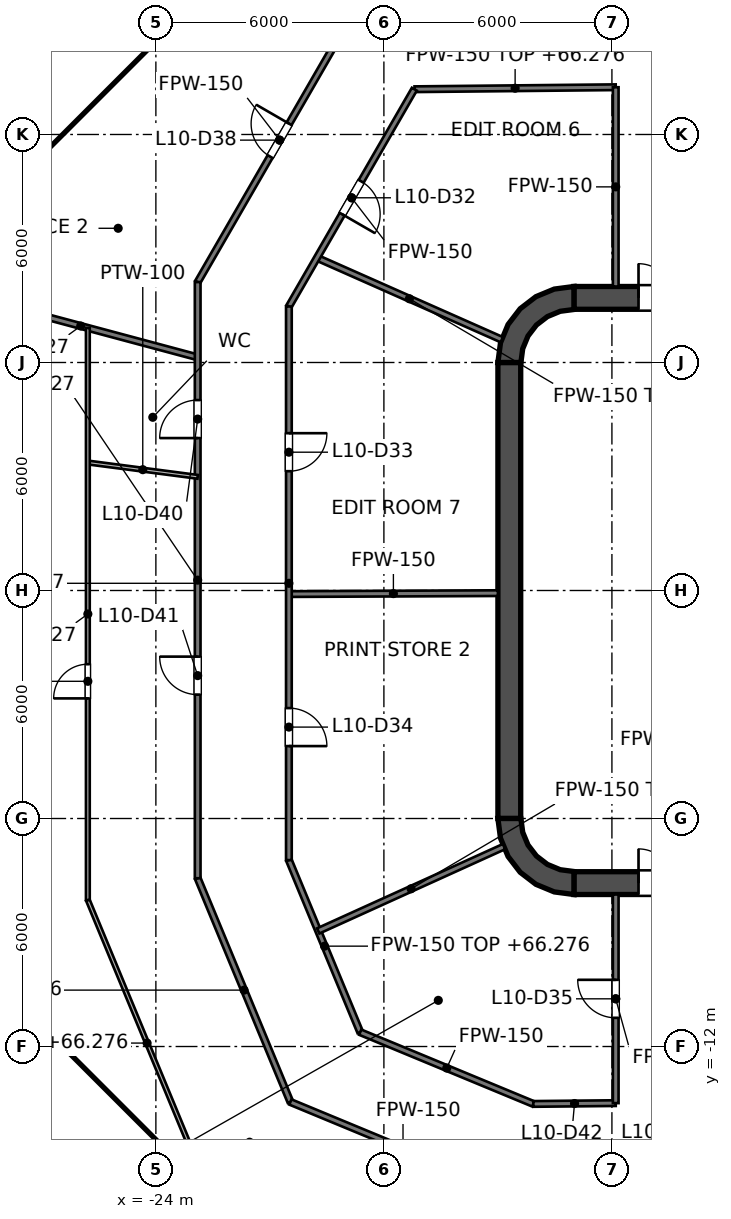
"""IFC4 building model, lengths in metres.
Left out: names, types, materials, properties, quantities, classifications, styles, units other than length and angle.
Written with IfcOpenShell. Run it as: python <this file> out.ifc"""

import sys

from ifc_helpers import new_model, si_unit, direction, frame, frame_2d, origin, place, context, subcontext, project, spatial, polyline, rectangle, outline, extrude, element, fill, save


model = new_model("IFC4")
c1 = context("Model", 3, precision=1e-05, world=origin(), true_north=direction((0.0, 1.0)))
c2 = subcontext(c1, "Body", "Model", "MODEL_VIEW")
j1 = project(units=[si_unit("LENGTHUNIT", "METRE"), si_unit("PLANEANGLEUNIT", "RADIAN")], contexts=[c1])
p1 = place(None, origin())
s1 = spatial("IfcSite", under=j1, at=p1, CompositionType="ELEMENT")
p2 = place(p1, origin())
s2 = spatial("IfcBuilding", under=s1, at=p2, CompositionType="ELEMENT")
p3 = place(p2, frame((0.0, 0.0, 63.0)))
s3 = spatial("IfcBuildingStorey", under=s2, at=p3, CompositionType="ELEMENT", Elevation=63.0)
p4 = place(p3, frame((-13.0, 7.7, 0.0), z_axis=(0.0, 0.0, 1.0), x_axis=(1.0, 0.0, 0.0)))
e1 = element("IfcWall", 1, at=p4, inside=s3, PredefinedType="SHEAR", context=c2, shape_type="SweptSolid", body=[
    extrude(rectangle(XDim=26.0, YDim=0.6, at=frame_2d((13.0, 0.0))), origin(), (0.0, 0.0, 1.0), 4.2),
])
p5 = place(p4, frame((1.7, 0.0, 0.0)))
e2 = element("IfcOpeningElement", 2, at=p5, cuts=e1, PredefinedType="OPENING", context=c2, shape_type="SweptSolid", body=[
    extrude(rectangle(XDim=1.8, YDim=2.1, at=frame_2d((0.9, 1.05))), frame((0.0, 0.3, 0.0), z_axis=(0.0, -1.0, 0.0), x_axis=(1.0, 0.0, 0.0)), (0.0, 0.0, 1.0), 0.6),
])
p6 = place(p4, frame((22.5, 0.0, 0.0)))
e3 = element("IfcOpeningElement", 3, at=p6, cuts=e1, PredefinedType="OPENING", context=c2, shape_type="SweptSolid", body=[
    extrude(rectangle(XDim=1.8, YDim=2.1, at=frame_2d((0.9, 1.05))), frame((0.0, 0.3, 0.0), z_axis=(0.0, -1.0, 0.0), x_axis=(1.0, 0.0, 0.0)), (0.0, 0.0, 1.0), 0.6),
])
p7 = place(p3, frame((-13.0, -7.7, 0.0), z_axis=(0.0, 0.0, 1.0), x_axis=(1.0, 0.0, 0.0)))
e4 = element("IfcWall", 4, at=p7, inside=s3, PredefinedType="SHEAR", context=c2, shape_type="SweptSolid", body=[
    extrude(rectangle(XDim=26.0, YDim=0.6, at=frame_2d((13.0, 0.0))), origin(), (0.0, 0.0, 1.0), 4.2),
])
p8 = place(p7, frame((1.7, 0.0, 0.0)))
e5 = element("IfcOpeningElement", 5, at=p8, cuts=e4, PredefinedType="OPENING", context=c2, shape_type="SweptSolid", body=[
    extrude(rectangle(XDim=1.8, YDim=2.1, at=frame_2d((0.9, 1.05))), frame((0.0, 0.3, 0.0), z_axis=(0.0, -1.0, 0.0), x_axis=(1.0, 0.0, 0.0)), (0.0, 0.0, 1.0), 0.6),
])
p9 = place(p7, frame((22.5, 0.0, 0.0)))
e6 = element("IfcOpeningElement", 6, at=p9, cuts=e4, PredefinedType="OPENING", context=c2, shape_type="SweptSolid", body=[
    extrude(rectangle(XDim=1.8, YDim=2.1, at=frame_2d((0.9, 1.05))), frame((0.0, 0.3, 0.0), z_axis=(0.0, -1.0, 0.0), x_axis=(1.0, 0.0, 0.0)), (0.0, 0.0, 1.0), 0.6),
])
p10 = place(p3, frame((-14.7, -6.0, 0.0), z_axis=(0.0, 0.0, 1.0), x_axis=(0.0, 1.0, 0.0)))
e7 = element("IfcWall", 7, at=p10, inside=s3, PredefinedType="SHEAR", context=c2, shape_type="SweptSolid", body=[
    extrude(rectangle(XDim=12.0, YDim=0.6, at=frame_2d((6.0, 0.0))), origin(), (0.0, 0.0, 1.0), 4.2),
])
p11 = place(p3, origin())
e8 = element("IfcWall", 8, at=p11, inside=s3, PredefinedType="SHEAR", context=c2, shape_type="SweptSolid", body=[
    extrude(outline(polyline([(-15.0, 6.0), (-14.395, 6.0), (-14.347, 6.361), (-14.208, 6.698), (-13.986, 6.986), (-13.698, 7.208), (-13.361, 7.347), (-13.0, 7.395), (-13.0, 8.0), (-13.518, 7.932), (-14.0, 7.732), (-14.414, 7.414), (-14.732, 7.0), (-14.932, 6.518), (-15.0, 6.0)])), origin(), (0.0, 0.0, 1.0), 4.2),
])
e9 = element("IfcWall", 9, at=p11, inside=s3, PredefinedType="SHEAR", context=c2, shape_type="SweptSolid", body=[
    extrude(outline(polyline([(-13.0, -8.0), (-13.0, -7.395), (-13.361, -7.347), (-13.698, -7.208), (-13.986, -6.986), (-14.208, -6.698), (-14.347, -6.361), (-14.395, -6.0), (-15.0, -6.0), (-14.932, -6.518), (-14.732, -7.0), (-14.414, -7.414), (-14.0, -7.732), (-13.518, -7.932), (-13.0, -8.0)])), origin(), (0.0, 0.0, 1.0), 4.2),
])
p12 = place(p3, frame((-11.8, -7.4, 0.0), z_axis=(0.0, 0.0, 1.0), x_axis=(0.0, 1.0, 0.0)))
e10 = element("IfcWall", 10, at=p12, inside=s3, PredefinedType="SOLIDWALL", context=c2, shape_type="SweptSolid", body=[
    extrude(rectangle(XDim=14.8, YDim=0.4, at=frame_2d((7.4, 0.0))), origin(), (0.0, 0.0, 1.0), 4.05),
])
p13 = place(p12, frame((11.2, 0.0, 0.0)))
e11 = element("IfcOpeningElement", 11, at=p13, cuts=e10, PredefinedType="OPENING", context=c2, shape_type="SweptSolid", body=[
    extrude(rectangle(XDim=1.1, YDim=2.1, at=frame_2d((0.55, 1.05))), frame((0.0, 0.2, 0.0), z_axis=(0.0, -1.0, 0.0), x_axis=(1.0, 0.0, 0.0)), (0.0, 0.0, 1.0), 0.4),
])
p14 = place(p12, frame((8.3, 0.0, 0.0)))
e12 = element("IfcOpeningElement", 12, at=p14, cuts=e10, PredefinedType="OPENING", context=c2, shape_type="SweptSolid", body=[
    extrude(rectangle(XDim=1.1, YDim=2.1, at=frame_2d((0.55, 1.05))), frame((0.0, 0.2, 0.0), z_axis=(0.0, -1.0, 0.0), x_axis=(1.0, 0.0, 0.0)), (0.0, 0.0, 1.0), 0.4),
])
p15 = place(p12, frame((5.4, 0.0, 0.0)))
e13 = element("IfcOpeningElement", 13, at=p15, cuts=e10, PredefinedType="OPENING", context=c2, shape_type="SweptSolid", body=[
    extrude(rectangle(XDim=1.1, YDim=2.1, at=frame_2d((0.55, 1.05))), frame((0.0, 0.2, 0.0), z_axis=(0.0, -1.0, 0.0), x_axis=(1.0, 0.0, 0.0)), (0.0, 0.0, 1.0), 0.4),
])
p16 = place(p12, frame((13.552, 0.0, 0.0)))
e14 = element("IfcOpeningElement", 14, at=p16, cuts=e10, PredefinedType="OPENING", context=c2, shape_type="SweptSolid", body=[
    extrude(rectangle(XDim=0.9, YDim=2.1, at=frame_2d((0.45, 1.05))), frame((0.0, 0.2, 0.0), z_axis=(0.0, -1.0, 0.0), x_axis=(1.0, 0.0, 0.0)), (0.0, 0.0, 1.0), 0.4),
])
p17 = place(p12, frame((0.347, 0.0, 0.0)))
e15 = element("IfcOpeningElement", 15, at=p17, cuts=e10, PredefinedType="OPENING", context=c2, shape_type="SweptSolid", body=[
    extrude(rectangle(XDim=0.9, YDim=2.1, at=frame_2d((0.45, 1.05))), frame((0.0, 0.2, 0.0), z_axis=(0.0, -1.0, 0.0), x_axis=(1.0, 0.0, 0.0)), (0.0, 0.0, 1.0), 0.4),
])
e16 = element("IfcWall", 16, at=p11, inside=s3, PredefinedType="SOLIDWALL", context=c2, shape_type="SweptSolid", body=[
    extrude(outline(polyline([(-12.0, -5.925), (-12.0, -5.675), (-14.15, -5.675), (-14.15, -3.025), (-12.0, -3.025), (-12.0, -2.775), (-14.15, -2.775), (-14.15, -0.125), (-12.0, -0.125), (-12.0, 0.125), (-14.15, 0.125), (-14.15, 2.775), (-12.0, 2.775), (-12.0, 3.025), (-14.15, 3.025), (-14.15, 5.675), (-12.0, 5.675), (-12.0, 5.925), (-14.15, 5.925), (-14.4, 5.925), (-14.4, 5.675), (-14.4, 3.025), (-14.4, 2.775), (-14.4, 0.125), (-14.4, -0.125), (-14.4, -2.775), (-14.4, -3.025), (-14.4, -5.675), (-14.4, -5.925), (-14.15, -5.925), (-12.0, -5.925)])), origin(), (0.0, 0.0, 1.0), 4.05),
])
p18 = place(p3, frame((-22.9, -7.572, 0.0), z_axis=(0.0, 0.0, 1.0), x_axis=(0.382860357704, -0.923806227788, 0.0)))
e17 = element("IfcWall", 17, at=p18, inside=s3, PredefinedType="PARTITIONING", context=c2, shape_type="SweptSolid", body=[
    extrude(rectangle(XDim=6.374, YDim=0.15, at=frame_2d((3.187, 0.0))), origin(), (0.0, 0.0, 1.0), 3.276),
])
p19 = place(p3, frame((-20.5, -7.095, 0.0), z_axis=(0.0, 0.0, 1.0), x_axis=(0.382878184095, -0.923798839653, 0.0)))
e18 = element("IfcWall", 18, at=p19, inside=s3, PredefinedType="PARTITIONING", context=c2, shape_type="SweptSolid", body=[
    extrude(rectangle(XDim=4.902, YDim=0.15, at=frame_2d((2.451, 0.0))), origin(), (0.0, 0.0, 1.0), 3.276),
])
p20 = place(p3, frame((-19.76, 8.755, 0.0), z_axis=(0.0, 0.0, 1.0), x_axis=(0.91424834547, -0.405154245695, 0.0)))
e19 = element("IfcWall", 19, at=p20, inside=s3, PredefinedType="PARTITIONING", context=c2, shape_type="SweptSolid", body=[
    extrude(rectangle(XDim=5.318, YDim=0.15, at=frame_2d((2.659, 0.0))), origin(), (0.0, 0.0, 1.0), 3.276),
])
p21 = place(p3, frame((-20.46, -13.46, 0.0), z_axis=(0.0, 0.0, 1.0), x_axis=(0.923801547606, -0.382871650349, 0.0)))
e20 = element("IfcWall", 20, at=p21, inside=s3, PredefinedType="PARTITIONING", context=c2, shape_type="SweptSolid", body=[
    extrude(rectangle(XDim=6.415, YDim=0.15, at=frame_2d((3.208, 0.0))), origin(), (0.0, 0.0, 1.0), 3.195),
])
p22 = place(p3, frame((-18.623, -11.623, 0.0), z_axis=(0.0, 0.0, 1.0), x_axis=(0.923816441303, -0.382835712518, 0.0)))
e21 = element("IfcWall", 21, at=p22, inside=s3, PredefinedType="PARTITIONING", context=c2, shape_type="SweptSolid", body=[
    extrude(rectangle(XDim=4.931, YDim=0.15, at=frame_2d((2.465, 0.0))), origin(), (0.0, 0.0, 1.0), 3.195),
])
p23 = place(p3, frame((-29.055, 7.785, 0.0), z_axis=(0.0, 0.0, 1.0), x_axis=(0.965937962099, -0.258773749396, 0.0)))
e22 = element("IfcWall", 22, at=p23, inside=s3, PredefinedType="PARTITIONING", context=c2, shape_type="SweptSolid", body=[
    extrude(rectangle(XDim=6.372, YDim=0.15, at=frame_2d((3.186, 0.0))), origin(), (0.0, 0.0, 1.0), 3.727),
])
p24 = place(p3, frame((-20.5, -0.094, 0.0), z_axis=(0.0, 0.0, 1.0), x_axis=(0.999990148138, 0.004438876723, 0.0)))
e23 = element("IfcWall", 23, at=p24, inside=s3, PredefinedType="PARTITIONING", context=c2, shape_type="SweptSolid", body=[
    extrude(rectangle(XDim=5.5, YDim=0.15, at=frame_2d((2.75, 0.0))), origin(), (0.0, 0.0, 1.0), 3.195),
])
p25 = place(p3, frame((-14.068, -13.511, 0.0), z_axis=(0.0, 0.0, 1.0), x_axis=(0.999950911515, 0.009908307647, 0.0)))
e24 = element("IfcWall", 24, at=p25, inside=s3, PredefinedType="PARTITIONING", context=c2, shape_type="SweptSolid", body=[
    extrude(rectangle(XDim=2.168, YDim=0.15, at=frame_2d((1.084, 0.0))), origin(), (0.0, 0.0, 1.0), 3.276),
])
p26 = place(p3, frame((-17.194, 13.191, 0.0), z_axis=(0.0, 0.0, 1.0), x_axis=(0.999950394899, 0.009960308291, 0.0)))
e25 = element("IfcWall", 25, at=p26, inside=s3, PredefinedType="PARTITIONING", context=c2, shape_type="SweptSolid", body=[
    extrude(rectangle(XDim=5.294, YDim=0.15, at=frame_2d((2.647, 0.0))), origin(), (0.0, 0.0, 1.0), 3.276),
])
p27 = place(p3, frame((-19.728, -8.958, 0.0), z_axis=(0.0, 0.0, 1.0), x_axis=(0.910629511797, 0.413223779863, 0.0)))
e26 = element("IfcWall", 26, at=p27, inside=s3, PredefinedType="PARTITIONING", context=c2, shape_type="SweptSolid", body=[
    extrude(rectangle(XDim=5.368, YDim=0.15, at=frame_2d((2.684, 0.0))), origin(), (0.0, 0.0, 1.0), 4.05),
])
p28 = place(p3, frame((-20.5, 7.474, 0.0), z_axis=(0.0, 0.0, 1.0), x_axis=(0.500012665616, 0.866018091164, 0.0)))
e27 = element("IfcWall", 27, at=p28, inside=s3, PredefinedType="PARTITIONING", context=c2, shape_type="SweptSolid", body=[
    extrude(rectangle(XDim=6.602, YDim=0.15, at=frame_2d((3.301, 0.0))), origin(), (0.0, 0.0, 1.0), 3.195),
])
p29 = place(p28, frame((2.803, 0.0, 0.0)))
e28 = element("IfcOpeningElement", 28, at=p29, cuts=e27, PredefinedType="OPENING", context=c2, shape_type="SweptSolid", body=[
    extrude(rectangle(XDim=1.0, YDim=2.1, at=frame_2d((0.5, 1.05))), frame((0.0, 0.075, 0.0), z_axis=(0.0, -1.0, 0.0), x_axis=(1.0, 0.0, 0.0)), (0.0, 0.0, 1.0), 0.15),
])
p30 = place(p3, frame((-22.9, 8.117, 0.0), z_axis=(0.0, 0.0, 1.0), x_axis=(0.499983791763, 0.866034761412, 0.0)))
e29 = element("IfcWall", 29, at=p30, inside=s3, PredefinedType="PARTITIONING", context=c2, shape_type="SweptSolid", body=[
    extrude(rectangle(XDim=8.626, YDim=0.15, at=frame_2d((4.313, 0.0))), origin(), (0.0, 0.0, 1.0), 3.195),
])
p31 = place(p30, frame((3.812, 0.0, 0.0)))
e30 = element("IfcOpeningElement", 30, at=p31, cuts=e29, PredefinedType="OPENING", context=c2, shape_type="SweptSolid", body=[
    extrude(rectangle(XDim=1.0, YDim=2.1, at=frame_2d((0.5, 1.05))), frame((0.0, 0.075, 0.0), z_axis=(0.0, -1.0, 0.0), x_axis=(1.0, 0.0, 0.0)), (0.0, 0.0, 1.0), 0.15),
])
p32 = place(p3, frame((-11.9, -13.49, 0.0), z_axis=(0.0, 0.0, 1.0), x_axis=(0.0, 1.0, 0.0)))
e31 = element("IfcWall", 31, at=p32, inside=s3, PredefinedType="PARTITIONING", context=c2, shape_type="SweptSolid", body=[
    extrude(rectangle(XDim=5.49, YDim=0.15, at=frame_2d((2.745, 0.0))), origin(), (0.0, 0.0, 1.0), 3.195),
])
p33 = place(p32, frame((2.245, 0.0, 0.0)))
e32 = element("IfcOpeningElement", 32, at=p33, cuts=e31, PredefinedType="OPENING", context=c2, shape_type="SweptSolid", body=[
    extrude(rectangle(XDim=1.0, YDim=2.1, at=frame_2d((0.5, 1.05))), frame((0.0, 0.075, 0.0), z_axis=(0.0, -1.0, 0.0), x_axis=(1.0, 0.0, 0.0)), (0.0, 0.0, 1.0), 0.15),
])
p34 = place(p3, frame((-11.9, 8.0, 0.0), z_axis=(0.0, 0.0, 1.0), x_axis=(0.0, 1.0, 0.0)))
e33 = element("IfcWall", 33, at=p34, inside=s3, PredefinedType="PARTITIONING", context=c2, shape_type="SweptSolid", body=[
    extrude(rectangle(XDim=5.243, YDim=0.15, at=frame_2d((2.622, 0.0))), origin(), (0.0, 0.0, 1.0), 3.195),
])
p35 = place(p3, frame((-20.5, -7.095, 0.0), z_axis=(0.0, 0.0, 1.0), x_axis=(0.0, 1.0, 0.0)))
e34 = element("IfcWall", 34, at=p35, inside=s3, PredefinedType="PARTITIONING", context=c2, shape_type="SweptSolid", body=[
    extrude(rectangle(XDim=14.569, YDim=0.15, at=frame_2d((7.285, 0.0))), origin(), (0.0, 0.0, 1.0), 3.127),
])
p36 = place(p35, frame((10.234, 0.0, 0.0)))
e35 = element("IfcOpeningElement", 35, at=p36, cuts=e34, PredefinedType="OPENING", context=c2, shape_type="SweptSolid", body=[
    extrude(rectangle(XDim=1.0, YDim=2.1, at=frame_2d((0.5, 1.05))), frame((0.0, 0.075, 0.0), z_axis=(0.0, -1.0, 0.0), x_axis=(1.0, 0.0, 0.0)), (0.0, 0.0, 1.0), 0.15),
])
p37 = place(p35, frame((3.0, 0.0, 0.0)))
e36 = element("IfcOpeningElement", 36, at=p37, cuts=e34, PredefinedType="OPENING", context=c2, shape_type="SweptSolid", body=[
    extrude(rectangle(XDim=1.0, YDim=2.1, at=frame_2d((0.5, 1.05))), frame((0.0, 0.075, 0.0), z_axis=(0.0, -1.0, 0.0), x_axis=(1.0, 0.0, 0.0)), (0.0, 0.0, 1.0), 0.15),
])
p38 = place(p3, frame((-22.9, -7.572, 0.0), z_axis=(0.0, 0.0, 1.0), x_axis=(0.0, 1.0, 0.0)))
e37 = element("IfcWall", 37, at=p38, inside=s3, PredefinedType="PARTITIONING", context=c2, shape_type="SweptSolid", body=[
    extrude(rectangle(XDim=15.689, YDim=0.15, at=frame_2d((7.844, 0.0))), origin(), (0.0, 0.0, 1.0), 3.127),
])
p39 = place(p38, frame((11.583, 0.0, 0.0)))
e38 = element("IfcOpeningElement", 38, at=p39, cuts=e37, PredefinedType="OPENING", context=c2, shape_type="SweptSolid", body=[
    extrude(rectangle(XDim=1.0, YDim=2.1, at=frame_2d((0.5, 1.05))), frame((0.0, 0.075, 0.0), z_axis=(0.0, -1.0, 0.0), x_axis=(1.0, 0.0, 0.0)), (0.0, 0.0, 1.0), 0.15),
])
p40 = place(p38, frame((4.832, 0.0, 0.0)))
e39 = element("IfcOpeningElement", 39, at=p40, cuts=e37, PredefinedType="OPENING", context=c2, shape_type="SweptSolid", body=[
    extrude(rectangle(XDim=1.0, YDim=2.1, at=frame_2d((0.5, 1.05))), frame((0.0, 0.075, 0.0), z_axis=(0.0, -1.0, 0.0), x_axis=(1.0, 0.0, 0.0)), (0.0, 0.0, 1.0), 0.15),
])
p41 = place(p3, frame((-25.79, -8.147, 0.0), z_axis=(0.0, 0.0, 1.0), x_axis=(0.382777969207, -0.923840368402, 0.0)))
e40 = element("IfcWall", 40, at=p41, inside=s3, PredefinedType="PARTITIONING", context=c2, shape_type="SweptSolid", body=[
    extrude(rectangle(XDim=8.146, YDim=0.1, at=frame_2d((4.073, 0.0))), origin(), (0.0, 0.0, 1.0), 3.276),
])
p42 = place(p3, frame((-25.79, 3.368, 0.0), z_axis=(0.0, 0.0, 1.0), x_axis=(0.991601345334, -0.129332022064, 0.0)))
e41 = element("IfcWall", 41, at=p42, inside=s3, PredefinedType="PARTITIONING", context=c2, shape_type="SweptSolid", body=[
    extrude(rectangle(XDim=2.915, YDim=0.1, at=frame_2d((1.457, 0.0))), origin(), (0.0, 0.0, 1.0), 4.05),
])
p43 = place(p3, frame((-25.79, -8.147, 0.0), z_axis=(0.0, 0.0, 1.0), x_axis=(0.0, 1.0, 0.0)))
e42 = element("IfcWall", 42, at=p43, inside=s3, PredefinedType="PARTITIONING", context=c2, shape_type="SweptSolid", body=[
    extrude(rectangle(XDim=15.057, YDim=0.1, at=frame_2d((7.528, 0.0))), origin(), (0.0, 0.0, 1.0), 3.127),
])
p44 = place(p43, frame((5.308, 0.0, 0.0)))
e43 = element("IfcOpeningElement", 43, at=p44, cuts=e42, PredefinedType="OPENING", context=c2, shape_type="SweptSolid", body=[
    extrude(rectangle(XDim=0.9, YDim=2.1, at=frame_2d((0.45, 1.05))), frame((0.0, 0.05, 0.0), z_axis=(0.0, -1.0, 0.0), x_axis=(1.0, 0.0, 0.0)), (0.0, 0.0, 1.0), 0.1),
])
p45 = place(p13, origin())
e44 = element("IfcDoor", 44, at=p45, inside=s3, OperationType="DOUBLE_DOOR_SLIDING", PredefinedType="DOOR", context=c2, shape_type="SweptSolid", body=[
    extrude(rectangle(XDim=1.1, YDim=2.1, at=frame_2d((0.55, 1.05))), frame((0.0, 0.025, 0.0), z_axis=(0.0, -1.0, 0.0), x_axis=(1.0, 0.0, 0.0)), (0.0, 0.0, 1.0), 0.05),
])
fill(e11, e44)
p46 = place(p14, origin())
e45 = element("IfcDoor", 45, at=p46, inside=s3, OperationType="DOUBLE_DOOR_SLIDING", PredefinedType="DOOR", context=c2, shape_type="SweptSolid", body=[
    extrude(rectangle(XDim=1.1, YDim=2.1, at=frame_2d((0.55, 1.05))), frame((0.0, 0.025, 0.0), z_axis=(0.0, -1.0, 0.0), x_axis=(1.0, 0.0, 0.0)), (0.0, 0.0, 1.0), 0.05),
])
fill(e12, e45)
p47 = place(p15, origin())
e46 = element("IfcDoor", 46, at=p47, inside=s3, OperationType="DOUBLE_DOOR_SLIDING", PredefinedType="DOOR", context=c2, shape_type="SweptSolid", body=[
    extrude(rectangle(XDim=1.1, YDim=2.1, at=frame_2d((0.55, 1.05))), frame((0.0, 0.025, 0.0), z_axis=(0.0, -1.0, 0.0), x_axis=(1.0, 0.0, 0.0)), (0.0, 0.0, 1.0), 0.05),
])
fill(e13, e46)
p48 = place(p16, origin())
e47 = element("IfcDoor", 47, at=p48, inside=s3, OperationType="SINGLE_SWING_LEFT", PredefinedType="DOOR", context=c2, shape_type="SweptSolid", body=[
    extrude(rectangle(XDim=0.9, YDim=2.1, at=frame_2d((0.45, 1.05))), frame((0.0, 0.025, 0.0), z_axis=(0.0, -1.0, 0.0), x_axis=(1.0, 0.0, 0.0)), (0.0, 0.0, 1.0), 0.05),
])
fill(e14, e47)
p49 = place(p17, origin())
e48 = element("IfcDoor", 48, at=p49, inside=s3, OperationType="SINGLE_SWING_LEFT", PredefinedType="DOOR", context=c2, shape_type="SweptSolid", body=[
    extrude(rectangle(XDim=0.9, YDim=2.1, at=frame_2d((0.45, 1.05))), frame((0.0, 0.025, 0.0), z_axis=(0.0, -1.0, 0.0), x_axis=(1.0, 0.0, 0.0)), (0.0, 0.0, 1.0), 0.05),
])
fill(e15, e48)
p50 = place(p5, origin())
e49 = element("IfcDoor", 49, at=p50, inside=s3, OperationType="DOUBLE_DOOR_SINGLE_SWING", PredefinedType="DOOR", context=c2, shape_type="SweptSolid", body=[
    extrude(rectangle(XDim=1.8, YDim=2.1, at=frame_2d((0.9, 1.05))), frame((0.0, 0.025, 0.0), z_axis=(0.0, -1.0, 0.0), x_axis=(1.0, 0.0, 0.0)), (0.0, 0.0, 1.0), 0.05),
])
fill(e2, e49)
p51 = place(p8, origin())
e50 = element("IfcDoor", 50, at=p51, inside=s3, OperationType="DOUBLE_DOOR_SINGLE_SWING", PredefinedType="DOOR", context=c2, shape_type="SweptSolid", body=[
    extrude(rectangle(XDim=1.8, YDim=2.1, at=frame_2d((0.9, 1.05))), frame((0.0, 0.025, 0.0), z_axis=(0.0, -1.0, 0.0), x_axis=(1.0, 0.0, 0.0)), (0.0, 0.0, 1.0), 0.05),
])
fill(e5, e50)
p52 = place(p29, origin())
e51 = element("IfcDoor", 51, at=p52, inside=s3, OperationType="SINGLE_SWING_LEFT", PredefinedType="DOOR", context=c2, shape_type="SweptSolid", body=[
    extrude(rectangle(XDim=1.0, YDim=2.1, at=frame_2d((0.5, 1.05))), frame((0.0, 0.025, 0.0), z_axis=(0.0, -1.0, 0.0), x_axis=(1.0, 0.0, 0.0)), (0.0, 0.0, 1.0), 0.05),
])
fill(e28, e51)
p53 = place(p36, origin())
e52 = element("IfcDoor", 52, at=p53, inside=s3, OperationType="SINGLE_SWING_RIGHT", PredefinedType="DOOR", context=c2, shape_type="SweptSolid", body=[
    extrude(rectangle(XDim=1.0, YDim=2.1, at=frame_2d((0.5, 1.05))), frame((0.0, 0.025, 0.0), z_axis=(0.0, -1.0, 0.0), x_axis=(1.0, 0.0, 0.0)), (0.0, 0.0, 1.0), 0.05),
])
fill(e35, e52)
p54 = place(p37, origin())
e53 = element("IfcDoor", 53, at=p54, inside=s3, OperationType="SINGLE_SWING_LEFT", PredefinedType="DOOR", context=c2, shape_type="SweptSolid", body=[
    extrude(rectangle(XDim=1.0, YDim=2.1, at=frame_2d((0.5, 1.05))), frame((0.0, 0.025, 0.0), z_axis=(0.0, -1.0, 0.0), x_axis=(1.0, 0.0, 0.0)), (0.0, 0.0, 1.0), 0.05),
])
fill(e36, e53)
p55 = place(p33, origin())
e54 = element("IfcDoor", 54, at=p55, inside=s3, OperationType="SINGLE_SWING_RIGHT", PredefinedType="DOOR", context=c2, shape_type="SweptSolid", body=[
    extrude(rectangle(XDim=1.0, YDim=2.1, at=frame_2d((0.5, 1.05))), frame((0.0, 0.025, 0.0), z_axis=(0.0, -1.0, 0.0), x_axis=(1.0, 0.0, 0.0)), (0.0, 0.0, 1.0), 0.05),
])
fill(e32, e54)
p56 = place(p31, origin())
e55 = element("IfcDoor", 55, at=p56, inside=s3, OperationType="SINGLE_SWING_RIGHT", PredefinedType="DOOR", context=c2, shape_type="SweptSolid", body=[
    extrude(rectangle(XDim=1.0, YDim=2.1, at=frame_2d((0.5, 1.05))), frame((0.0, 0.025, 0.0), z_axis=(0.0, -1.0, 0.0), x_axis=(1.0, 0.0, 0.0)), (0.0, 0.0, 1.0), 0.05),
])
fill(e30, e55)
p57 = place(p39, origin())
e56 = element("IfcDoor", 56, at=p57, inside=s3, OperationType="SINGLE_SWING_LEFT", PredefinedType="DOOR", context=c2, shape_type="SweptSolid", body=[
    extrude(rectangle(XDim=1.0, YDim=2.1, at=frame_2d((0.5, 1.05))), frame((0.0, 0.025, 0.0), z_axis=(0.0, -1.0, 0.0), x_axis=(1.0, 0.0, 0.0)), (0.0, 0.0, 1.0), 0.05),
])
fill(e38, e56)
p58 = place(p40, origin())
e57 = element("IfcDoor", 57, at=p58, inside=s3, OperationType="SINGLE_SWING_RIGHT", PredefinedType="DOOR", context=c2, shape_type="SweptSolid", body=[
    extrude(rectangle(XDim=1.0, YDim=2.1, at=frame_2d((0.5, 1.05))), frame((0.0, 0.025, 0.0), z_axis=(0.0, -1.0, 0.0), x_axis=(1.0, 0.0, 0.0)), (0.0, 0.0, 1.0), 0.05),
])
fill(e39, e57)
p59 = place(p44, origin())
e58 = element("IfcDoor", 58, at=p59, inside=s3, OperationType="SINGLE_SWING_LEFT", PredefinedType="DOOR", context=c2, shape_type="SweptSolid", body=[
    extrude(rectangle(XDim=0.9, YDim=2.1, at=frame_2d((0.45, 1.05))), frame((0.0, 0.025, 0.0), z_axis=(0.0, -1.0, 0.0), x_axis=(1.0, 0.0, 0.0)), (0.0, 0.0, 1.0), 0.05),
])
fill(e43, e58)
save(model, sys.argv[1])
